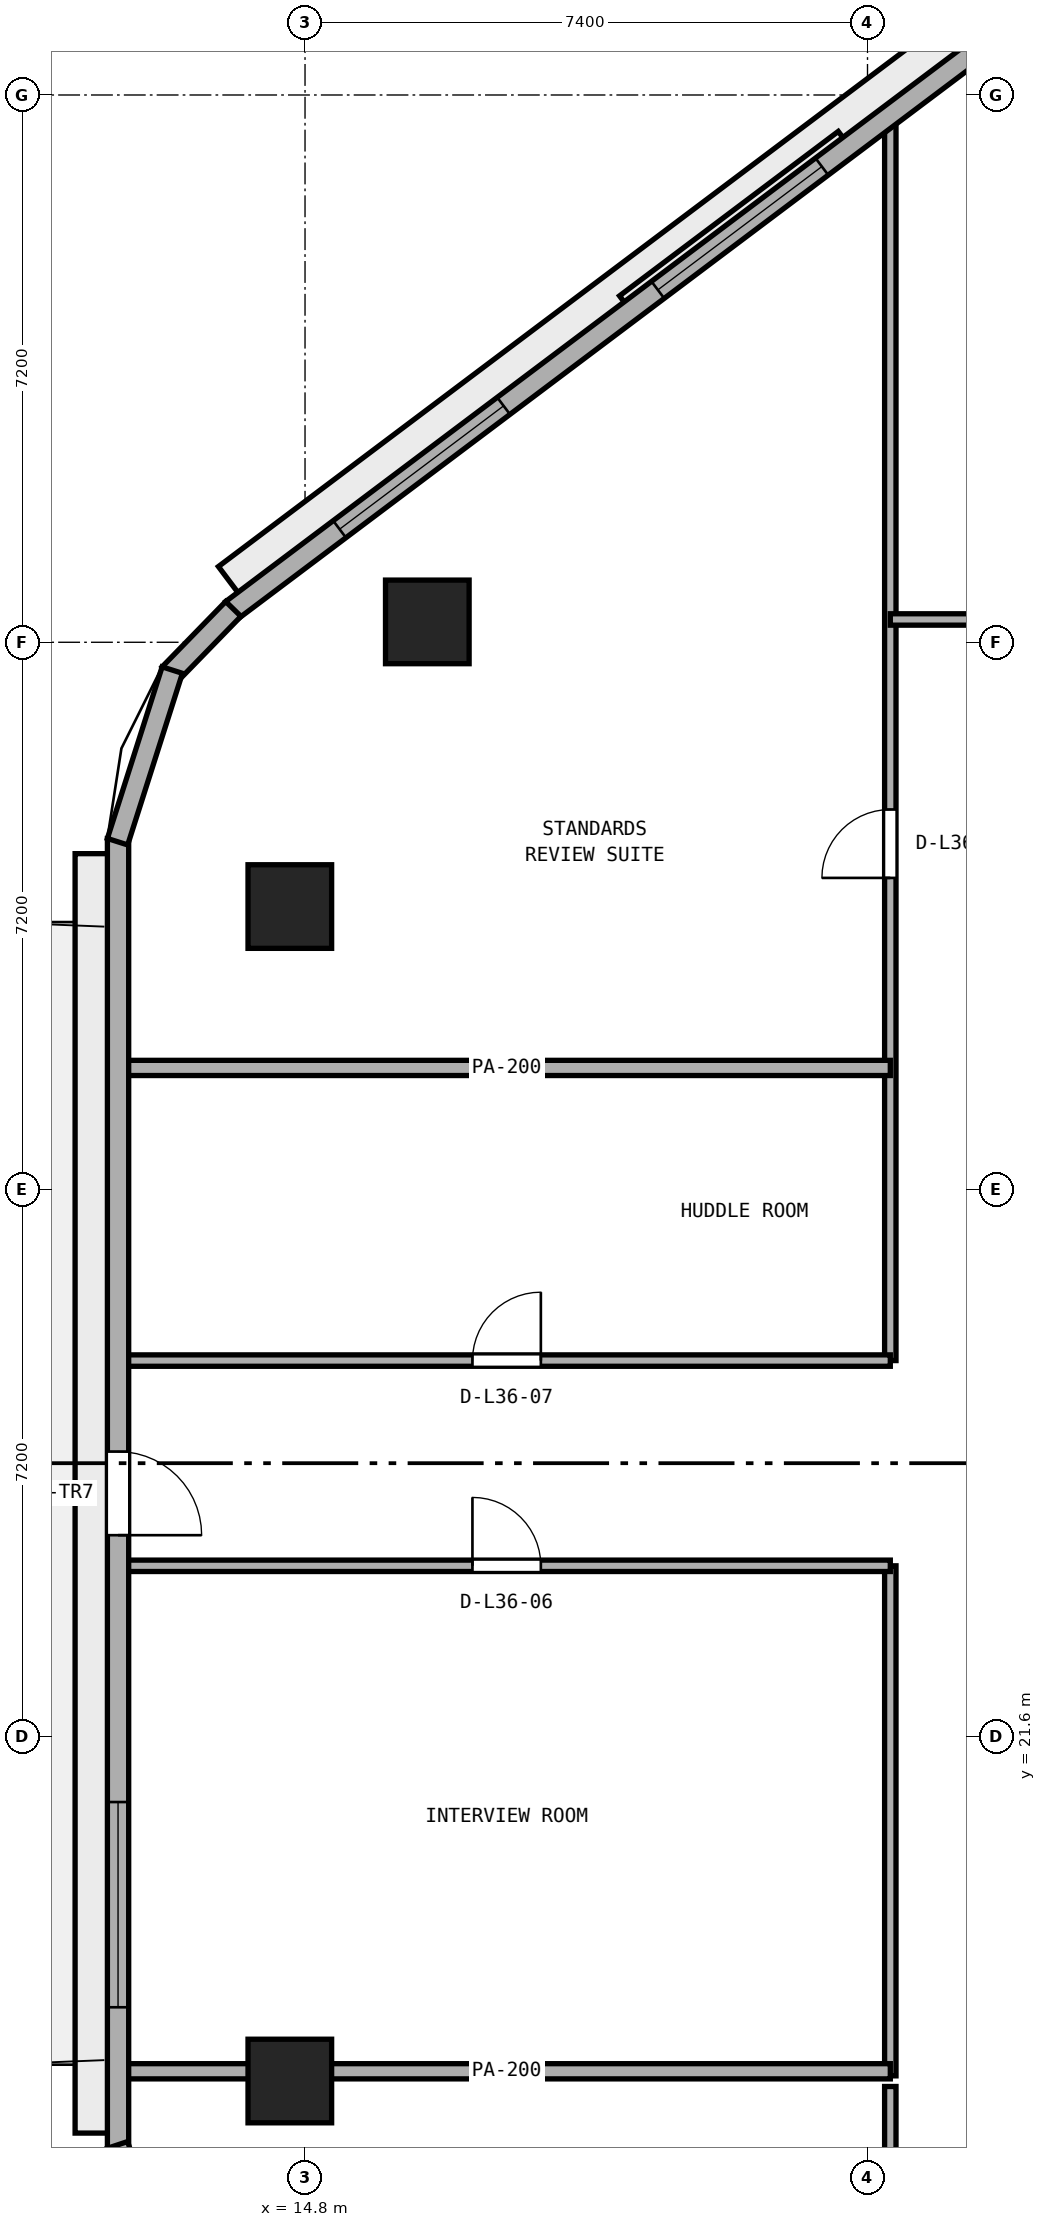
"""IFC4 building model, lengths in metres.
Left out: names, types, materials, properties, quantities, classifications, styles, units other than length and angle.
Written with IfcOpenShell. Run it as: python <this file> out.ifc"""

import sys

from ifc_helpers import new_model, si_unit, direction, frame, frame_2d, origin, origin_2d, place, context, subcontext, project, spatial, rectangle, extrude, element, fill, save


model = new_model("IFC4")
c1 = context("Model", 3, precision=1e-05, world=origin(), true_north=direction((0.0, 1.0)))
c2 = subcontext(c1, "Body", "Model", "MODEL_VIEW")
j1 = project(units=[si_unit("LENGTHUNIT", "METRE"), si_unit("PLANEANGLEUNIT", "RADIAN")], contexts=[c1])
p1 = place(None, origin())
s1 = spatial("IfcSite", under=j1, at=p1, CompositionType="ELEMENT")
p2 = place(p1, origin())
s2 = spatial("IfcBuilding", under=s1, at=p2, CompositionType="ELEMENT")
p3 = place(p2, frame((0.0, 0.0, 144.0)))
s3 = spatial("IfcBuildingStorey", under=s2, at=p3, CompositionType="ELEMENT", Elevation=144.0)
for number, where, z_axis, x_axis in (
    (1, (16.409, 36.268, 0.0), (0.0, 0.0, 1.0), (1.0, 0.0, 0.0)),
    (2, (14.6, 32.523, 0.0), (0.0, 0.0, 1.0), (1.0, 0.0, 0.0)),
    (3, (14.6, 17.072, 0.0), (0.0, 0.0, 1.0), (1.0, 0.0, 0.0)),
):
    element("IfcColumn", number, at=place(p3, frame(where, z_axis=z_axis, x_axis=x_axis)), inside=s3, PredefinedType="COLUMN", context=c2, shape_type="SweptSolid", body=[
        extrude(rectangle(XDim=1.1, YDim=1.1, at=origin_2d()), origin(), (0.0, 0.0, 1.0), 3.8),
    ])
p4 = place(p3, frame((22.5, 7.119, 0.0), z_axis=(0.0, 0.0, 1.0), x_axis=(0.0, 1.0, 0.0)))
e4 = element("IfcWall", 4, at=p4, inside=s3, PredefinedType="PARTITIONING", context=c2, shape_type="SweptSolid", body=[
    extrude(rectangle(XDim=9.881, YDim=0.15, at=frame_2d((4.94, 0.0))), origin(), (0.0, 0.0, 1.0), 3.54),
])
p5 = place(p4, frame((7.861, 0.0, 0.0)))
e5 = element("IfcOpeningElement", 5, at=p5, cuts=e4, PredefinedType="OPENING", context=c2, shape_type="SweptSolid", body=[
    extrude(rectangle(XDim=0.9, YDim=2.1, at=frame_2d((0.45, 1.05))), frame((0.0, 0.085, 0.0), z_axis=(0.0, -1.0, 0.0), x_axis=(1.0, 0.0, 0.0)), (0.0, 0.0, 1.0), 0.17),
])
p6 = place(p3, frame((22.5, 17.14, 0.0), z_axis=(0.0, 0.0, 1.0), x_axis=(0.0, 1.0, 0.0)))
e6 = element("IfcWall", 6, at=p6, inside=s3, PredefinedType="PARTITIONING", context=c2, shape_type="SweptSolid", body=[
    extrude(rectangle(XDim=6.71, YDim=0.15, at=frame_2d((3.355, 0.0))), origin(), (0.0, 0.0, 1.0), 3.54),
])
p7 = place(p3, frame((22.5, 26.55, 0.0), z_axis=(0.0, 0.0, 1.0), x_axis=(0.0, 1.0, 0.0)))
e7 = element("IfcWall", 7, at=p7, inside=s3, PredefinedType="PARTITIONING", context=c2, shape_type="SweptSolid", body=[
    extrude(rectangle(XDim=16.42, YDim=0.15, at=frame_2d((8.21, 0.0))), origin(), (0.0, 0.0, 1.0), 3.54),
])
p8 = place(p7, frame((6.35, 0.0, 0.0)))
e8 = element("IfcOpeningElement", 8, at=p8, cuts=e7, PredefinedType="OPENING", context=c2, shape_type="SweptSolid", body=[
    extrude(rectangle(XDim=0.9, YDim=2.1, at=frame_2d((0.45, 1.05))), frame((0.0, 0.085, 0.0), z_axis=(0.0, -1.0, 0.0), x_axis=(1.0, 0.0, 0.0)), (0.0, 0.0, 1.0), 0.17),
])
p9 = place(p3, frame((12.405, 17.2, 0.0), z_axis=(0.0, 0.0, 1.0), x_axis=(1.0, 0.0, 0.0)))
e9 = element("IfcWall", 9, at=p9, inside=s3, PredefinedType="PARTITIONING", context=c2, shape_type="SweptSolid", body=[
    extrude(rectangle(XDim=10.095, YDim=0.2, at=frame_2d((5.047, 0.0))), origin(), (0.0, 0.0, 1.0), 2.923),
])
p10 = place(p3, frame((12.405, 23.85, 0.0), z_axis=(0.0, 0.0, 1.0), x_axis=(1.0, 0.0, 0.0)))
e10 = element("IfcWall", 10, at=p10, inside=s3, PredefinedType="PARTITIONING", context=c2, shape_type="SweptSolid", body=[
    extrude(rectangle(XDim=10.095, YDim=0.15, at=frame_2d((5.047, 0.0))), origin(), (0.0, 0.0, 1.0), 3.54),
])
p11 = place(p10, frame((4.597, 0.0, 0.0)))
e11 = element("IfcOpeningElement", 11, at=p11, cuts=e10, PredefinedType="OPENING", context=c2, shape_type="SweptSolid", body=[
    extrude(rectangle(XDim=0.9, YDim=2.1, at=frame_2d((0.45, 1.05))), frame((0.0, 0.085, 0.0), z_axis=(0.0, -1.0, 0.0), x_axis=(1.0, 0.0, 0.0)), (0.0, 0.0, 1.0), 0.17),
])
p12 = place(p3, frame((12.405, 26.55, 0.0), z_axis=(0.0, 0.0, 1.0), x_axis=(1.0, 0.0, 0.0)))
e12 = element("IfcWall", 12, at=p12, inside=s3, PredefinedType="PARTITIONING", context=c2, shape_type="SweptSolid", body=[
    extrude(rectangle(XDim=10.095, YDim=0.15, at=frame_2d((5.047, 0.0))), origin(), (0.0, 0.0, 1.0), 3.54),
])
p13 = place(p12, frame((4.597, 0.0, 0.0)))
e13 = element("IfcOpeningElement", 13, at=p13, cuts=e12, PredefinedType="OPENING", context=c2, shape_type="SweptSolid", body=[
    extrude(rectangle(XDim=0.9, YDim=2.1, at=frame_2d((0.45, 1.05))), frame((0.0, 0.085, 0.0), z_axis=(0.0, -1.0, 0.0), x_axis=(1.0, 0.0, 0.0)), (0.0, 0.0, 1.0), 0.17),
])
p14 = place(p3, frame((12.405, 30.4, 0.0), z_axis=(0.0, 0.0, 1.0), x_axis=(1.0, 0.0, 0.0)))
e14 = element("IfcWall", 14, at=p14, inside=s3, PredefinedType="PARTITIONING", context=c2, shape_type="SweptSolid", body=[
    extrude(rectangle(XDim=10.095, YDim=0.2, at=frame_2d((5.047, 0.0))), origin(), (0.0, 0.0, 1.0), 3.54),
])
p15 = place(p3, frame((22.5, 36.3, 0.0), z_axis=(0.0, 0.0, 1.0), x_axis=(1.0, 0.0, 0.0)))
e15 = element("IfcWall", 15, at=p15, inside=s3, PredefinedType="PARTITIONING", context=c2, shape_type="SweptSolid", body=[
    extrude(rectangle(XDim=11.9, YDim=0.15, at=frame_2d((5.95, 0.0))), origin(), (0.0, 0.0, 1.0), 3.54),
])
p16 = place(p15, frame((3.17, 0.0, 0.0)))
e16 = element("IfcOpeningElement", 16, at=p16, cuts=e15, PredefinedType="OPENING", context=c2, shape_type="SweptSolid", body=[
    extrude(rectangle(XDim=1.0, YDim=2.12, at=frame_2d((0.5, 1.06))), frame((0.0, 0.085, 0.0), z_axis=(0.0, -1.0, 0.0), x_axis=(1.0, 0.0, 0.0)), (0.0, 0.0, 1.0), 0.17),
])
p17 = place(p15, frame((8.88, 0.0, 0.0)))
e17 = element("IfcOpeningElement", 17, at=p17, cuts=e15, PredefinedType="OPENING", context=c2, shape_type="SweptSolid", body=[
    extrude(rectangle(XDim=1.0, YDim=2.12, at=frame_2d((0.5, 1.06))), frame((0.0, 0.085, 0.0), z_axis=(0.0, -1.0, 0.0), x_axis=(1.0, 0.0, 0.0)), (0.0, 0.0, 1.0), 0.17),
])
p18 = place(p3, frame((27.201, 46.47, 0.0), z_axis=(0.0, 0.0, 1.0), x_axis=(-0.799280853427, -0.600957666849, 0.0)))
e18 = element("IfcWall", 18, at=p18, inside=s3, PredefinedType="STANDARD", context=c2, shape_type="SweptSolid", body=[
    extrude(rectangle(XDim=16.716, YDim=0.28, at=frame_2d((8.358, 0.0))), origin(), (0.0, 0.0, 1.0), 3.54),
])
p19 = place(p18, frame((1.769, 0.0, 0.9)))
e19 = element("IfcOpeningElement", 19, at=p19, cuts=e18, PredefinedType="OPENING", context=c2, shape_type="SweptSolid", body=[
    extrude(rectangle(XDim=2.7, YDim=1.75, at=frame_2d((1.35, 0.875))), frame((0.0, 0.15, 0.0), z_axis=(0.0, -1.0, 0.0), x_axis=(1.0, 0.0, 0.0)), (0.0, 0.0, 1.0), 0.3),
])
p20 = place(p18, frame((7.008, 0.0, 0.9)))
e20 = element("IfcOpeningElement", 20, at=p20, cuts=e18, PredefinedType="OPENING", context=c2, shape_type="SweptSolid", body=[
    extrude(rectangle(XDim=2.7, YDim=1.75, at=frame_2d((1.35, 0.875))), frame((0.0, 0.15, 0.0), z_axis=(0.0, -1.0, 0.0), x_axis=(1.0, 0.0, 0.0)), (0.0, 0.0, 1.0), 0.3),
])
p21 = place(p18, frame((12.247, 0.0, 0.9)))
e21 = element("IfcOpeningElement", 21, at=p21, cuts=e18, PredefinedType="OPENING", context=c2, shape_type="SweptSolid", body=[
    extrude(rectangle(XDim=2.7, YDim=1.75, at=frame_2d((1.35, 0.875))), frame((0.0, 0.15, 0.0), z_axis=(0.0, -1.0, 0.0), x_axis=(1.0, 0.0, 0.0)), (0.0, 0.0, 1.0), 0.3),
])
p22 = place(p3, frame((12.34, 33.419, 0.0), z_axis=(0.0, 0.0, 1.0), x_axis=(0.0, -1.0, 0.0)))
e22 = element("IfcWall", 22, at=p22, inside=s3, PredefinedType="STANDARD", context=c2, shape_type="SweptSolid", body=[
    extrude(rectangle(XDim=17.232, YDim=0.28, at=frame_2d((8.616, 0.0))), origin(), (0.0, 0.0, 1.0), 3.54),
])
p23 = place(p22, frame((8.066, 0.0, 0.0)))
e23 = element("IfcOpeningElement", 23, at=p23, cuts=e22, PredefinedType="OPENING", context=c2, shape_type="SweptSolid", body=[
    extrude(rectangle(XDim=1.1, YDim=2.2, at=frame_2d((0.55, 1.1))), frame((0.0, 0.15, 0.0), z_axis=(0.0, -1.0, 0.0), x_axis=(1.0, 0.0, 0.0)), (0.0, 0.0, 1.0), 0.3),
])
p24 = place(p22, frame((12.677, 0.0, 0.9)))
e24 = element("IfcOpeningElement", 24, at=p24, cuts=e22, PredefinedType="OPENING", context=c2, shape_type="SweptSolid", body=[
    extrude(rectangle(XDim=2.7, YDim=1.75, at=frame_2d((1.35, 0.875))), frame((0.0, 0.15, 0.0), z_axis=(0.0, -1.0, 0.0), x_axis=(1.0, 0.0, 0.0)), (0.0, 0.0, 1.0), 0.3),
])
p25 = place(p3, frame((13.856, 36.438, 0.0), z_axis=(0.0, 0.0, 1.0), x_axis=(-0.697369094044, -0.716712178404, 0.0)))
e25 = element("IfcWall", 25, at=p25, inside=s3, PredefinedType="STANDARD", context=c2, shape_type="SweptSolid", body=[
    extrude(rectangle(XDim=1.199, YDim=0.28, at=frame_2d((0.6, 0.0))), origin(), (0.0, 0.0, 1.0), 3.54),
])
p26 = place(p3, frame((13.053, 35.634, 0.0), z_axis=(0.0, 0.0, 1.0), x_axis=(-0.303807416298, -0.952733464198, 0.0)))
e26 = element("IfcWall", 26, at=p26, inside=s3, PredefinedType="STANDARD", context=c2, shape_type="SweptSolid", body=[
    extrude(rectangle(XDim=2.37, YDim=0.28, at=frame_2d((1.185, 0.0))), origin(), (0.0, 0.0, 1.0), 3.54),
])
p27 = place(p3, frame((12.333, 16.231, 0.0), z_axis=(0.0, 0.0, 1.0), x_axis=(0.315364302967, -0.94897068259, 0.0)))
e27 = element("IfcWall", 27, at=p27, inside=s3, PredefinedType="STANDARD", context=c2, shape_type="SweptSolid", body=[
    extrude(rectangle(XDim=2.46, YDim=0.28, at=frame_2d((1.23, 0.0))), origin(), (0.0, 0.0, 1.0), 3.54),
])
p28 = place(p11, origin())
e28 = element("IfcDoor", 28, at=p28, inside=s3, OperationType="SINGLE_SWING_LEFT", PredefinedType="DOOR", context=c2, shape_type="SweptSolid", body=[
    extrude(rectangle(XDim=0.9, YDim=2.1, at=frame_2d((0.45, 1.05))), frame((0.0, 0.025, 0.0), z_axis=(0.0, -1.0, 0.0), x_axis=(1.0, 0.0, 0.0)), (0.0, 0.0, 1.0), 0.05),
])
fill(e11, e28)
p29 = place(p13, origin())
e29 = element("IfcDoor", 29, at=p29, inside=s3, OperationType="SINGLE_SWING_RIGHT", PredefinedType="DOOR", context=c2, shape_type="SweptSolid", body=[
    extrude(rectangle(XDim=0.9, YDim=2.1, at=frame_2d((0.45, 1.05))), frame((0.0, 0.025, 0.0), z_axis=(0.0, -1.0, 0.0), x_axis=(1.0, 0.0, 0.0)), (0.0, 0.0, 1.0), 0.05),
])
fill(e13, e29)
p30 = place(p8, origin())
e30 = element("IfcDoor", 30, at=p30, inside=s3, OperationType="SINGLE_SWING_LEFT", PredefinedType="DOOR", context=c2, shape_type="SweptSolid", body=[
    extrude(rectangle(XDim=0.9, YDim=2.1, at=frame_2d((0.45, 1.05))), frame((0.0, 0.025, 0.0), z_axis=(0.0, -1.0, 0.0), x_axis=(1.0, 0.0, 0.0)), (0.0, 0.0, 1.0), 0.05),
])
fill(e8, e30)
p31 = place(p20, origin())
e31 = element("IfcWindow", 31, at=p31, inside=s3, PartitioningType="SINGLE_PANEL", PredefinedType="WINDOW", context=c2, shape_type="SweptSolid", body=[
    extrude(rectangle(XDim=2.7, YDim=1.75, at=frame_2d((1.35, 0.875))), frame((0.0, 0.03, 0.0), z_axis=(0.0, -1.0, 0.0), x_axis=(1.0, 0.0, 0.0)), (0.0, 0.0, 1.0), 0.06),
])
fill(e20, e31)
p32 = place(p21, origin())
e32 = element("IfcWindow", 32, at=p32, inside=s3, PartitioningType="SINGLE_PANEL", PredefinedType="WINDOW", context=c2, shape_type="SweptSolid", body=[
    extrude(rectangle(XDim=2.7, YDim=1.75, at=frame_2d((1.35, 0.875))), frame((0.0, 0.03, 0.0), z_axis=(0.0, -1.0, 0.0), x_axis=(1.0, 0.0, 0.0)), (0.0, 0.0, 1.0), 0.06),
])
fill(e21, e32)
p33 = place(p23, origin())
e33 = element("IfcDoor", 33, at=p33, inside=s3, OperationType="SINGLE_SWING_RIGHT", PredefinedType="DOOR", context=c2, shape_type="SweptSolid", body=[
    extrude(rectangle(XDim=1.1, YDim=2.2, at=frame_2d((0.55, 1.1))), frame((0.0, 0.025, 0.0), z_axis=(0.0, -1.0, 0.0), x_axis=(1.0, 0.0, 0.0)), (0.0, 0.0, 1.0), 0.05),
])
fill(e23, e33)
p34 = place(p24, origin())
e34 = element("IfcWindow", 34, at=p34, inside=s3, PartitioningType="SINGLE_PANEL", PredefinedType="WINDOW", context=c2, shape_type="SweptSolid", body=[
    extrude(rectangle(XDim=2.7, YDim=1.75, at=frame_2d((1.35, 0.875))), frame((0.0, 0.03, 0.0), z_axis=(0.0, -1.0, 0.0), x_axis=(1.0, 0.0, 0.0)), (0.0, 0.0, 1.0), 0.06),
])
fill(e24, e34)
save(model, sys.argv[1])
